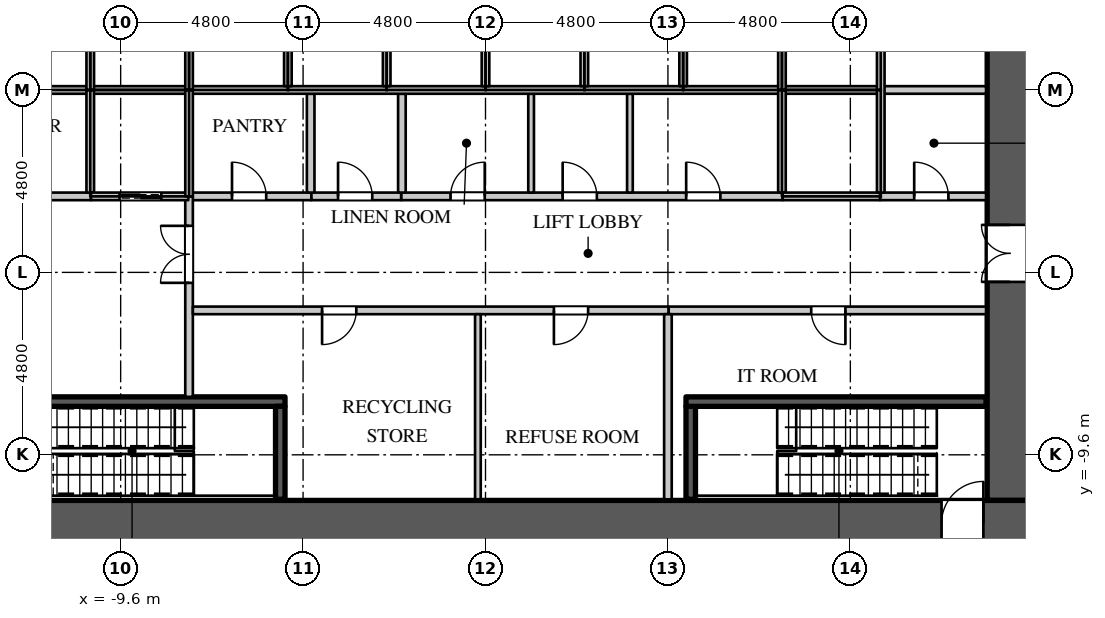
"""IFC4 building model, lengths in metres.
Left out: names, types, materials, properties, quantities, classifications, styles, units other than length and angle.
Written with IfcOpenShell. Run it as: python <this file> out.ifc"""

import sys

from ifc_helpers import new_model, si_unit, direction, frame, frame_2d, origin, place, context, subcontext, project, spatial, rectangle, extrude, element, fill, save


model = new_model("IFC4")
c1 = context("Model", 3, precision=1e-05, world=origin(), true_north=direction((0.0, 1.0)))
c2 = subcontext(c1, "Body", "Model", "MODEL_VIEW")
j1 = project(units=[si_unit("LENGTHUNIT", "METRE"), si_unit("PLANEANGLEUNIT", "RADIAN")], contexts=[c1])
p1 = place(None, origin())
s1 = spatial("IfcSite", under=j1, at=p1, CompositionType="ELEMENT")
p2 = place(p1, origin())
s2 = spatial("IfcBuilding", under=s1, at=p2, CompositionType="ELEMENT")
p3 = place(p2, frame((0.0, 0.0, 6.0)))
s3 = spatial("IfcBuildingStorey", under=s2, at=p3, CompositionType="ELEMENT", Elevation=6.0)
p4 = place(p3, frame((-14.4, -11.4, 0.0), z_axis=(0.0, 0.0, 1.0), x_axis=(1.0, 0.0, 0.0)))
e1 = element("IfcWall", 1, at=p4, inside=s3, PredefinedType="SHEAR", context=c2, shape_type="SweptSolid", body=[
    extrude(rectangle(XDim=28.8, YDim=1.2, at=frame_2d((14.4, 0.0))), origin(), (0.0, 0.0, 1.0), 5.0),
])
p5 = place(p4, frame((1.3, 0.0, 0.0)))
e2 = element("IfcOpeningElement", 2, at=p5, cuts=e1, PredefinedType="OPENING", context=c2, shape_type="SweptSolid", body=[
    extrude(rectangle(XDim=1.1, YDim=2.2, at=frame_2d((0.55, 1.1))), frame((0.0, 0.61, 0.0), z_axis=(0.0, -1.0, 0.0), x_axis=(1.0, 0.0, 0.0)), (0.0, 0.0, 1.0), 1.22),
])
p6 = place(p4, frame((26.4, 0.0, 0.0)))
e3 = element("IfcOpeningElement", 3, at=p6, cuts=e1, PredefinedType="OPENING", context=c2, shape_type="SweptSolid", body=[
    extrude(rectangle(XDim=1.1, YDim=2.2, at=frame_2d((0.55, 1.1))), frame((0.0, 0.61, 0.0), z_axis=(0.0, -1.0, 0.0), x_axis=(1.0, 0.0, 0.0)), (0.0, 0.0, 1.0), 1.22),
])
p7 = place(p3, frame((13.8, -10.8, 0.0), z_axis=(0.0, 0.0, 1.0), x_axis=(0.0, 1.0, 0.0)))
e4 = element("IfcWall", 4, at=p7, inside=s3, PredefinedType="SHEAR", context=c2, shape_type="SweptSolid", body=[
    extrude(rectangle(XDim=21.6, YDim=1.2, at=frame_2d((10.8, 0.0))), origin(), (0.0, 0.0, 1.0), 5.0),
])
p8 = place(p7, frame((14.35, 0.0, 0.0)))
e5 = element("IfcOpeningElement", 5, at=p8, cuts=e4, PredefinedType="OPENING", context=c2, shape_type="SweptSolid", body=[
    extrude(rectangle(XDim=1.5, YDim=2.4, at=frame_2d((0.75, 1.2))), frame((0.0, 0.61, 0.0), z_axis=(0.0, -1.0, 0.0), x_axis=(1.0, 0.0, 0.0)), (0.0, 0.0, 1.0), 1.22),
])
p9 = place(p7, frame((5.75, 0.0, 0.0)))
e6 = element("IfcOpeningElement", 6, at=p9, cuts=e4, PredefinedType="OPENING", context=c2, shape_type="SweptSolid", body=[
    extrude(rectangle(XDim=1.5, YDim=2.4, at=frame_2d((0.75, 1.2))), frame((0.0, 0.61, 0.0), z_axis=(0.0, -1.0, 0.0), x_axis=(1.0, 0.0, 0.0)), (0.0, 0.0, 1.0), 1.22),
])
p10 = place(p3, frame((-7.82, -2.8, 0.0), z_axis=(0.0, 0.0, 1.0), x_axis=(1.0, 0.0, 0.0)))
e7 = element("IfcWall", 7, at=p10, inside=s3, PredefinedType="PARTITIONING", context=c2, shape_type="SweptSolid", body=[
    extrude(rectangle(XDim=3.24, YDim=0.2, at=frame_2d((1.62, 0.0))), origin(), (0.0, 0.0, 1.0), 4.4),
])
p11 = place(p10, frame((1.15, 0.0, 0.0)))
e8 = element("IfcOpeningElement", 8, at=p11, cuts=e7, PredefinedType="OPENING", context=c2, shape_type="SweptSolid", body=[
    extrude(rectangle(XDim=0.9, YDim=2.2, at=frame_2d((0.45, 1.1))), frame((0.0, 0.11, 0.0), z_axis=(0.0, -1.0, 0.0), x_axis=(1.0, 0.0, 0.0)), (0.0, 0.0, 1.0), 0.22),
])
p12 = place(p3, frame((-7.8, -8.075, 0.0), z_axis=(0.0, 0.0, 1.0), x_axis=(0.0, 1.0, 0.0)))
e9 = element("IfcWall", 9, at=p12, inside=s3, PredefinedType="PARTITIONING", context=c2, shape_type="SweptSolid", body=[
    extrude(rectangle(XDim=5.275, YDim=0.2, at=frame_2d((2.637, 0.0))), origin(), (0.0, 0.0, 1.0), 4.4),
])
p13 = place(p12, frame((3.0, 0.0, 0.0)))
e10 = element("IfcOpeningElement", 10, at=p13, cuts=e9, PredefinedType="OPENING", context=c2, shape_type="SweptSolid", body=[
    extrude(rectangle(XDim=1.5, YDim=2.4, at=frame_2d((0.75, 1.2))), frame((0.0, 0.11, 0.0), z_axis=(0.0, -1.0, 0.0), x_axis=(1.0, 0.0, 0.0)), (0.0, 0.0, 1.0), 0.22),
])
p14 = place(p3, frame((-7.7, -5.8, 0.0), z_axis=(0.0, 0.0, 1.0), x_axis=(1.0, 0.0, 0.0)))
e11 = element("IfcWall", 11, at=p14, inside=s3, PredefinedType="PARTITIONING", context=c2, shape_type="SweptSolid", body=[
    extrude(rectangle(XDim=12.52, YDim=0.2, at=frame_2d((6.26, 0.0))), origin(), (0.0, 0.0, 1.0), 4.4),
])
p15 = place(p14, frame((3.4, 0.0, 0.0)))
e12 = element("IfcOpeningElement", 12, at=p15, cuts=e11, PredefinedType="OPENING", context=c2, shape_type="SweptSolid", body=[
    extrude(rectangle(XDim=0.9, YDim=2.2, at=frame_2d((0.45, 1.1))), frame((0.0, 0.11, 0.0), z_axis=(0.0, -1.0, 0.0), x_axis=(1.0, 0.0, 0.0)), (0.0, 0.0, 1.0), 0.22),
])
p16 = place(p14, frame((9.5, 0.0, 0.0)))
e13 = element("IfcOpeningElement", 13, at=p16, cuts=e11, PredefinedType="OPENING", context=c2, shape_type="SweptSolid", body=[
    extrude(rectangle(XDim=0.9, YDim=2.2, at=frame_2d((0.45, 1.1))), frame((0.0, 0.11, 0.0), z_axis=(0.0, -1.0, 0.0), x_axis=(1.0, 0.0, 0.0)), (0.0, 0.0, 1.0), 0.22),
])
p17 = place(p3, frame((-2.22, -2.8, 0.0), z_axis=(0.0, 0.0, 1.0), x_axis=(1.0, 0.0, 0.0)))
e14 = element("IfcWall", 14, at=p17, inside=s3, PredefinedType="PARTITIONING", context=c2, shape_type="SweptSolid", body=[
    extrude(rectangle(XDim=10.04, YDim=0.2, at=frame_2d((5.02, 0.0))), origin(), (0.0, 0.0, 1.0), 4.4),
])
p18 = place(p17, frame((1.3, 0.0, 0.0)))
e15 = element("IfcOpeningElement", 15, at=p18, cuts=e14, PredefinedType="OPENING", context=c2, shape_type="SweptSolid", body=[
    extrude(rectangle(XDim=0.9, YDim=2.2, at=frame_2d((0.45, 1.1))), frame((0.0, 0.11, 0.0), z_axis=(0.0, -1.0, 0.0), x_axis=(1.0, 0.0, 0.0)), (0.0, 0.0, 1.0), 0.22),
])
p19 = place(p17, frame((4.25, 0.0, 0.0)))
e16 = element("IfcOpeningElement", 16, at=p19, cuts=e14, PredefinedType="OPENING", context=c2, shape_type="SweptSolid", body=[
    extrude(rectangle(XDim=0.9, YDim=2.2, at=frame_2d((0.45, 1.1))), frame((0.0, 0.11, 0.0), z_axis=(0.0, -1.0, 0.0), x_axis=(1.0, 0.0, 0.0)), (0.0, 0.0, 1.0), 0.22),
])
p20 = place(p17, frame((7.5, 0.0, 0.0)))
e17 = element("IfcOpeningElement", 17, at=p20, cuts=e14, PredefinedType="OPENING", context=c2, shape_type="SweptSolid", body=[
    extrude(rectangle(XDim=0.9, YDim=2.2, at=frame_2d((0.45, 1.1))), frame((0.0, 0.11, 0.0), z_axis=(0.0, -1.0, 0.0), x_axis=(1.0, 0.0, 0.0)), (0.0, 0.0, 1.0), 0.22),
])
p21 = place(p3, frame((-0.2, -10.77, 0.0), z_axis=(0.0, 0.0, 1.0), x_axis=(0.0, 1.0, 0.0)))
e18 = element("IfcWall", 18, at=p21, inside=s3, PredefinedType="PARTITIONING", context=c2, shape_type="SweptSolid", body=[
    extrude(rectangle(XDim=4.87, YDim=0.15, at=frame_2d((2.435, 0.0))), origin(), (0.0, 0.0, 1.0), 4.4),
])
for number, where, z_axis, x_axis in (
    (19, (1.2, -2.7, 0.0), (0.0, 0.0, 1.0), (0.0, 1.0, 0.0)),
    (20, (3.8, -2.7, 0.0), (0.0, 0.0, 1.0), (0.0, 1.0, 0.0)),
):
    element("IfcWall", number, at=place(p3, frame(where, z_axis=z_axis, x_axis=x_axis)), inside=s3, PredefinedType="PARTITIONING", context=c2, shape_type="SweptSolid", body=[
        extrude(rectangle(XDim=2.6, YDim=0.15, at=frame_2d((1.3, 0.0))), origin(), (0.0, 0.0, 1.0), 4.4),
    ])
p22 = place(p3, frame((-13.17, -2.8, 0.0), z_axis=(0.0, 0.0, 1.0), x_axis=(1.0, 0.0, 0.0)))
e21 = element("IfcWall", 21, at=p22, inside=s3, PredefinedType="PARTITIONING", context=c2, shape_type="SweptSolid", body=[
    extrude(rectangle(XDim=2.79, YDim=0.2, at=frame_2d((1.395, 0.0))), origin(), (0.0, 0.0, 1.0), 4.4),
])
p23 = place(p22, frame((1.05, 0.0, 0.0)))
e22 = element("IfcOpeningElement", 22, at=p23, cuts=e21, PredefinedType="OPENING", context=c2, shape_type="SweptSolid", body=[
    extrude(rectangle(XDim=0.6, YDim=2.0, at=frame_2d((0.3, 1.0))), frame((0.0, 0.11, 0.0), z_axis=(0.0, -1.0, 0.0), x_axis=(1.0, 0.0, 0.0)), (0.0, 0.0, 1.0), 0.22),
])
p24 = place(p3, frame((-4.58, -2.8, 0.0), z_axis=(0.0, 0.0, 1.0), x_axis=(1.0, 0.0, 0.0)))
e23 = element("IfcWall", 23, at=p24, inside=s3, PredefinedType="PARTITIONING", context=c2, shape_type="SweptSolid", body=[
    extrude(rectangle(XDim=2.36, YDim=0.2, at=frame_2d((1.18, 0.0))), origin(), (0.0, 0.0, 1.0), 4.4),
])
p25 = place(p24, frame((0.7, 0.0, 0.0)))
e24 = element("IfcOpeningElement", 24, at=p25, cuts=e23, PredefinedType="OPENING", context=c2, shape_type="SweptSolid", body=[
    extrude(rectangle(XDim=0.9, YDim=2.2, at=frame_2d((0.45, 1.1))), frame((0.0, 0.11, 0.0), z_axis=(0.0, -1.0, 0.0), x_axis=(1.0, 0.0, 0.0)), (0.0, 0.0, 1.0), 0.22),
])
for number, where, z_axis, x_axis in (
    (25, (-4.6, -2.7, 0.0), (0.0, 0.0, 1.0), (0.0, 1.0, 0.0)),
    (26, (-2.2, -2.7, 0.0), (0.0, 0.0, 1.0), (0.0, 1.0, 0.0)),
):
    element("IfcWall", number, at=place(p3, frame(where, z_axis=z_axis, x_axis=x_axis)), inside=s3, PredefinedType="PARTITIONING", context=c2, shape_type="SweptSolid", body=[
        extrude(rectangle(XDim=2.6, YDim=0.2, at=frame_2d((1.3, 0.0))), origin(), (0.0, 0.0, 1.0), 4.4),
    ])
p26 = place(p3, frame((4.82, -5.8, 0.0), z_axis=(0.0, 0.0, 1.0), x_axis=(1.0, 0.0, 0.0)))
e27 = element("IfcWall", 27, at=p26, inside=s3, PredefinedType="PARTITIONING", context=c2, shape_type="SweptSolid", body=[
    extrude(rectangle(XDim=8.35, YDim=0.2, at=frame_2d((4.175, 0.0))), origin(), (0.0, 0.0, 1.0), 4.4),
])
p27 = place(p26, frame((3.75, 0.0, 0.0)))
e28 = element("IfcOpeningElement", 28, at=p27, cuts=e27, PredefinedType="OPENING", context=c2, shape_type="SweptSolid", body=[
    extrude(rectangle(XDim=0.9, YDim=2.2, at=frame_2d((0.45, 1.1))), frame((0.0, 0.11, 0.0), z_axis=(0.0, -1.0, 0.0), x_axis=(1.0, 0.0, 0.0)), (0.0, 0.0, 1.0), 0.22),
])
p28 = place(p3, frame((4.8, -10.77, 0.0), z_axis=(0.0, 0.0, 1.0), x_axis=(0.0, 1.0, 0.0)))
e29 = element("IfcWall", 29, at=p28, inside=s3, PredefinedType="PARTITIONING", context=c2, shape_type="SweptSolid", body=[
    extrude(rectangle(XDim=4.87, YDim=0.2, at=frame_2d((2.435, 0.0))), origin(), (0.0, 0.0, 1.0), 4.4),
])
p29 = place(p3, frame((10.38, -2.8, 0.0), z_axis=(0.0, 0.0, 1.0), x_axis=(1.0, 0.0, 0.0)))
e30 = element("IfcWall", 30, at=p29, inside=s3, PredefinedType="PARTITIONING", context=c2, shape_type="SweptSolid", body=[
    extrude(rectangle(XDim=2.79, YDim=0.2, at=frame_2d((1.395, 0.0))), origin(), (0.0, 0.0, 1.0), 4.4),
])
p30 = place(p29, frame((0.9, 0.0, 0.0)))
e31 = element("IfcOpeningElement", 31, at=p30, cuts=e30, PredefinedType="OPENING", context=c2, shape_type="SweptSolid", body=[
    extrude(rectangle(XDim=0.9, YDim=2.2, at=frame_2d((0.45, 1.1))), frame((0.0, 0.11, 0.0), z_axis=(0.0, -1.0, 0.0), x_axis=(1.0, 0.0, 0.0)), (0.0, 0.0, 1.0), 0.22),
])
p31 = place(p3, frame((10.4, 0.0, 0.0), z_axis=(0.0, 0.0, 1.0), x_axis=(1.0, 0.0, 0.0)))
e32 = element("IfcWall", 32, at=p31, inside=s3, PredefinedType="PARTITIONING", context=c2, shape_type="SweptSolid", body=[
    extrude(rectangle(XDim=2.77, YDim=0.2, at=frame_2d((1.385, 0.0))), origin(), (0.0, 0.0, 1.0), 4.4),
])
p32 = place(p3, frame((-13.17, 0.0, 0.0), z_axis=(0.0, 0.0, 1.0), x_axis=(1.0, 0.0, 0.0)))
e33 = element("IfcWall", 33, at=p32, inside=s3, PredefinedType="PARTITIONING", context=c2, shape_type="SweptSolid", body=[
    extrude(rectangle(XDim=23.57, YDim=0.2, at=frame_2d((11.785, 0.0))), origin(), (0.0, 0.0, 1.0), 4.4),
])
p33 = place(p3, frame((-10.4, -2.7, 0.0), z_axis=(0.0, 0.0, 1.0), x_axis=(0.0, 1.0, 0.0)))
e34 = element("IfcWall", 34, at=p33, inside=s3, PredefinedType="PARTITIONING", context=c2, shape_type="SweptSolid", body=[
    extrude(rectangle(XDim=2.7, YDim=0.2, at=frame_2d((1.35, 0.0))), origin(), (0.0, 0.0, 1.0), 4.4),
])
p34 = place(p3, frame((-10.38, -2.8, 0.0), z_axis=(0.0, 0.0, 1.0), x_axis=(1.0, 0.0, 0.0)))
e35 = element("IfcWall", 35, at=p34, inside=s3, PredefinedType="PARTITIONING", context=c2, shape_type="SweptSolid", body=[
    extrude(rectangle(XDim=2.56, YDim=0.2, at=frame_2d((1.28, 0.0))), origin(), (0.0, 0.0, 1.0), 4.4),
])
p35 = place(p34, frame((0.75, 0.0, 0.0)))
e36 = element("IfcOpeningElement", 36, at=p35, cuts=e35, PredefinedType="OPENING", context=c2, shape_type="SweptSolid", body=[
    extrude(rectangle(XDim=1.1, YDim=2.2, at=frame_2d((0.55, 1.1))), frame((0.0, 0.11, 0.0), z_axis=(0.0, -1.0, 0.0), x_axis=(1.0, 0.0, 0.0)), (0.0, 0.0, 1.0), 0.22),
])
p36 = place(p3, frame((-10.4, 0.0, 0.0), z_axis=(0.0, 0.0, 1.0), x_axis=(0.0, 1.0, 0.0)))
e37 = element("IfcWall", 37, at=p36, inside=s3, PredefinedType="PARTITIONING", context=c2, shape_type="SweptSolid", body=[
    extrude(rectangle(XDim=2.7, YDim=0.2, at=frame_2d((1.35, 0.0))), origin(), (0.0, 0.0, 1.0), 4.4),
])
for number, where, z_axis, x_axis in (
    (38, (-7.8, -2.8, 0.0), (0.0, 0.0, 1.0), (0.0, 1.0, 0.0)),
    (39, (-7.8, 0.0, 0.0), (0.0, 0.0, 1.0), (0.0, 1.0, 0.0)),
):
    element("IfcWall", number, at=place(p3, frame(where, z_axis=z_axis, x_axis=x_axis)), inside=s3, PredefinedType="PARTITIONING", context=c2, shape_type="SweptSolid", body=[
        extrude(rectangle(XDim=2.8, YDim=0.2, at=frame_2d((1.4, 0.0))), origin(), (0.0, 0.0, 1.0), 4.4),
    ])
for number, where, z_axis, x_axis in (
    (40, (-5.2, 0.1, 0.0), (0.0, 0.0, 1.0), (0.0, 1.0, 0.0)),
    (41, (-2.6, 0.1, 0.0), (0.0, 0.0, 1.0), (0.0, 1.0, 0.0)),
    (42, (0.0, 0.1, 0.0), (0.0, 0.0, 1.0), (0.0, 1.0, 0.0)),
    (43, (2.6, 0.1, 0.0), (0.0, 0.0, 1.0), (0.0, 1.0, 0.0)),
    (44, (5.2, 0.1, 0.0), (0.0, 0.0, 1.0), (0.0, 1.0, 0.0)),
):
    element("IfcWall", number, at=place(p3, frame(where, z_axis=z_axis, x_axis=x_axis)), inside=s3, PredefinedType="PARTITIONING", context=c2, shape_type="SweptSolid", body=[
        extrude(rectangle(XDim=2.6, YDim=0.2, at=frame_2d((1.3, 0.0))), origin(), (0.0, 0.0, 1.0), 4.4),
    ])
p37 = place(p3, frame((7.8, -2.7, 0.0), z_axis=(0.0, 0.0, 1.0), x_axis=(0.0, 1.0, 0.0)))
e45 = element("IfcWall", 45, at=p37, inside=s3, PredefinedType="PARTITIONING", context=c2, shape_type="SweptSolid", body=[
    extrude(rectangle(XDim=2.7, YDim=0.2, at=frame_2d((1.35, 0.0))), origin(), (0.0, 0.0, 1.0), 4.4),
])
p38 = place(p3, frame((7.82, -2.8, 0.0), z_axis=(0.0, 0.0, 1.0), x_axis=(1.0, 0.0, 0.0)))
e46 = element("IfcWall", 46, at=p38, inside=s3, PredefinedType="PARTITIONING", context=c2, shape_type="SweptSolid", body=[
    extrude(rectangle(XDim=2.56, YDim=0.2, at=frame_2d((1.28, 0.0))), origin(), (0.0, 0.0, 1.0), 4.4),
])
p39 = place(p3, frame((7.8, 0.0, 0.0), z_axis=(0.0, 0.0, 1.0), x_axis=(0.0, 1.0, 0.0)))
e47 = element("IfcWall", 47, at=p39, inside=s3, PredefinedType="PARTITIONING", context=c2, shape_type="SweptSolid", body=[
    extrude(rectangle(XDim=2.7, YDim=0.2, at=frame_2d((1.35, 0.0))), origin(), (0.0, 0.0, 1.0), 4.4),
])
p40 = place(p3, frame((10.4, -2.7, 0.0), z_axis=(0.0, 0.0, 1.0), x_axis=(0.0, 1.0, 0.0)))
e48 = element("IfcWall", 48, at=p40, inside=s3, PredefinedType="PARTITIONING", context=c2, shape_type="SweptSolid", body=[
    extrude(rectangle(XDim=5.4, YDim=0.2, at=frame_2d((2.7, 0.0))), origin(), (0.0, 0.0, 1.0), 4.4),
])
p41 = place(p3, frame((-13.17, -8.2, 0.0), z_axis=(0.0, 0.0, 1.0), x_axis=(1.0, 0.0, 0.0)))
e49 = element("IfcWall", 49, at=p41, inside=s3, PredefinedType="SHEAR", context=c2, shape_type="SweptSolid", body=[
    extrude(rectangle(XDim=7.895, YDim=0.25, at=frame_2d((3.948, 0.0))), origin(), (0.0, 0.0, 1.0), 4.65),
])
p42 = place(p41, frame((0.15, 0.0, 0.0)))
e50 = element("IfcOpeningElement", 50, at=p42, cuts=e49, PredefinedType="OPENING", context=c2, shape_type="SweptSolid", body=[
    extrude(rectangle(XDim=1.1, YDim=2.2, at=frame_2d((0.55, 1.1))), frame((0.0, 0.135, 0.0), z_axis=(0.0, -1.0, 0.0), x_axis=(1.0, 0.0, 0.0)), (0.0, 0.0, 1.0), 0.27),
])
for number, where, z_axis, x_axis in (
    (51, (-5.4, -10.77, 0.0), (0.0, 0.0, 1.0), (0.0, 1.0, 0.0)),
    (52, (5.4, -10.77, 0.0), (0.0, 0.0, 1.0), (0.0, 1.0, 0.0)),
):
    element("IfcWall", number, at=place(p3, frame(where, z_axis=z_axis, x_axis=x_axis)), inside=s3, PredefinedType="SHEAR", context=c2, shape_type="SweptSolid", body=[
        extrude(rectangle(XDim=2.445, YDim=0.25, at=frame_2d((1.223, 0.0))), origin(), (0.0, 0.0, 1.0), 4.65),
    ])
p43 = place(p3, frame((5.275, -8.2, 0.0), z_axis=(0.0, 0.0, 1.0), x_axis=(1.0, 0.0, 0.0)))
e53 = element("IfcWall", 53, at=p43, inside=s3, PredefinedType="SHEAR", context=c2, shape_type="SweptSolid", body=[
    extrude(rectangle(XDim=7.895, YDim=0.25, at=frame_2d((3.948, 0.0))), origin(), (0.0, 0.0, 1.0), 4.65),
])
p44 = place(p30, origin())
e54 = element("IfcDoor", 54, at=p44, inside=s3, OperationType="SINGLE_SWING_LEFT", PredefinedType="DOOR", context=c2, shape_type="SweptSolid", body=[
    extrude(rectangle(XDim=0.9, YDim=2.2, at=frame_2d((0.45, 1.1))), frame((0.0, 0.025, 0.0), z_axis=(0.0, -1.0, 0.0), x_axis=(1.0, 0.0, 0.0)), (0.0, 0.0, 1.0), 0.05),
])
fill(e31, e54)
p45 = place(p15, origin())
e55 = element("IfcDoor", 55, at=p45, inside=s3, OperationType="SINGLE_SWING_RIGHT", PredefinedType="DOOR", context=c2, shape_type="SweptSolid", body=[
    extrude(rectangle(XDim=0.9, YDim=2.2, at=frame_2d((0.45, 1.1))), frame((0.0, 0.025, 0.0), z_axis=(0.0, -1.0, 0.0), x_axis=(1.0, 0.0, 0.0)), (0.0, 0.0, 1.0), 0.05),
])
fill(e12, e55)
p46 = place(p16, origin())
e56 = element("IfcDoor", 56, at=p46, inside=s3, OperationType="SINGLE_SWING_RIGHT", PredefinedType="DOOR", context=c2, shape_type="SweptSolid", body=[
    extrude(rectangle(XDim=0.9, YDim=2.2, at=frame_2d((0.45, 1.1))), frame((0.0, 0.025, 0.0), z_axis=(0.0, -1.0, 0.0), x_axis=(1.0, 0.0, 0.0)), (0.0, 0.0, 1.0), 0.05),
])
fill(e13, e56)
p47 = place(p27, origin())
e57 = element("IfcDoor", 57, at=p47, inside=s3, OperationType="SINGLE_SWING_LEFT", PredefinedType="DOOR", context=c2, shape_type="SweptSolid", body=[
    extrude(rectangle(XDim=0.9, YDim=2.2, at=frame_2d((0.45, 1.1))), frame((0.0, 0.025, 0.0), z_axis=(0.0, -1.0, 0.0), x_axis=(1.0, 0.0, 0.0)), (0.0, 0.0, 1.0), 0.05),
])
fill(e28, e57)
p48 = place(p11, origin())
e58 = element("IfcDoor", 58, at=p48, inside=s3, OperationType="SINGLE_SWING_LEFT", PredefinedType="DOOR", context=c2, shape_type="SweptSolid", body=[
    extrude(rectangle(XDim=0.9, YDim=2.2, at=frame_2d((0.45, 1.1))), frame((0.0, 0.025, 0.0), z_axis=(0.0, -1.0, 0.0), x_axis=(1.0, 0.0, 0.0)), (0.0, 0.0, 1.0), 0.05),
])
fill(e8, e58)
p49 = place(p25, origin())
e59 = element("IfcDoor", 59, at=p49, inside=s3, OperationType="SINGLE_SWING_LEFT", PredefinedType="DOOR", context=c2, shape_type="SweptSolid", body=[
    extrude(rectangle(XDim=0.9, YDim=2.2, at=frame_2d((0.45, 1.1))), frame((0.0, 0.025, 0.0), z_axis=(0.0, -1.0, 0.0), x_axis=(1.0, 0.0, 0.0)), (0.0, 0.0, 1.0), 0.05),
])
fill(e24, e59)
p50 = place(p18, origin())
e60 = element("IfcDoor", 60, at=p50, inside=s3, OperationType="SINGLE_SWING_RIGHT", PredefinedType="DOOR", context=c2, shape_type="SweptSolid", body=[
    extrude(rectangle(XDim=0.9, YDim=2.2, at=frame_2d((0.45, 1.1))), frame((0.0, 0.025, 0.0), z_axis=(0.0, -1.0, 0.0), x_axis=(1.0, 0.0, 0.0)), (0.0, 0.0, 1.0), 0.05),
])
fill(e15, e60)
p51 = place(p19, origin())
e61 = element("IfcDoor", 61, at=p51, inside=s3, OperationType="SINGLE_SWING_LEFT", PredefinedType="DOOR", context=c2, shape_type="SweptSolid", body=[
    extrude(rectangle(XDim=0.9, YDim=2.2, at=frame_2d((0.45, 1.1))), frame((0.0, 0.025, 0.0), z_axis=(0.0, -1.0, 0.0), x_axis=(1.0, 0.0, 0.0)), (0.0, 0.0, 1.0), 0.05),
])
fill(e16, e61)
p52 = place(p20, origin())
e62 = element("IfcDoor", 62, at=p52, inside=s3, OperationType="SINGLE_SWING_LEFT", PredefinedType="DOOR", context=c2, shape_type="SweptSolid", body=[
    extrude(rectangle(XDim=0.9, YDim=2.2, at=frame_2d((0.45, 1.1))), frame((0.0, 0.025, 0.0), z_axis=(0.0, -1.0, 0.0), x_axis=(1.0, 0.0, 0.0)), (0.0, 0.0, 1.0), 0.05),
])
fill(e17, e62)
p53 = place(p35, origin())
e63 = element("IfcDoor", 63, at=p53, inside=s3, OperationType="DOUBLE_DOOR_SLIDING", PredefinedType="DOOR", context=c2, shape_type="SweptSolid", body=[
    extrude(rectangle(XDim=1.1, YDim=2.2, at=frame_2d((0.55, 1.1))), frame((0.0, 0.025, 0.0), z_axis=(0.0, -1.0, 0.0), x_axis=(1.0, 0.0, 0.0)), (0.0, 0.0, 1.0), 0.05),
])
fill(e36, e63)
p54 = place(p13, origin())
e64 = element("IfcDoor", 64, at=p54, inside=s3, OperationType="DOUBLE_DOOR_SINGLE_SWING", PredefinedType="DOOR", context=c2, shape_type="SweptSolid", body=[
    extrude(rectangle(XDim=1.5, YDim=2.4, at=frame_2d((0.75, 1.2))), frame((0.0, 0.025, 0.0), z_axis=(0.0, -1.0, 0.0), x_axis=(1.0, 0.0, 0.0)), (0.0, 0.0, 1.0), 0.05),
])
fill(e10, e64)
p55 = place(p9, origin())
e65 = element("IfcDoor", 65, at=p55, inside=s3, OperationType="DOUBLE_DOOR_SINGLE_SWING", PredefinedType="DOOR", context=c2, shape_type="SweptSolid", body=[
    extrude(rectangle(XDim=1.5, YDim=2.4, at=frame_2d((0.75, 1.2))), frame((0.0, 0.025, 0.0), z_axis=(0.0, -1.0, 0.0), x_axis=(1.0, 0.0, 0.0)), (0.0, 0.0, 1.0), 0.05),
])
fill(e6, e65)
p56 = place(p6, origin())
e66 = element("IfcDoor", 66, at=p56, inside=s3, OperationType="SINGLE_SWING_RIGHT", PredefinedType="DOOR", context=c2, shape_type="SweptSolid", body=[
    extrude(rectangle(XDim=1.1, YDim=2.2, at=frame_2d((0.55, 1.1))), frame((0.0, 0.025, 0.0), z_axis=(0.0, -1.0, 0.0), x_axis=(1.0, 0.0, 0.0)), (0.0, 0.0, 1.0), 0.05),
])
fill(e3, e66)
save(model, sys.argv[1])
